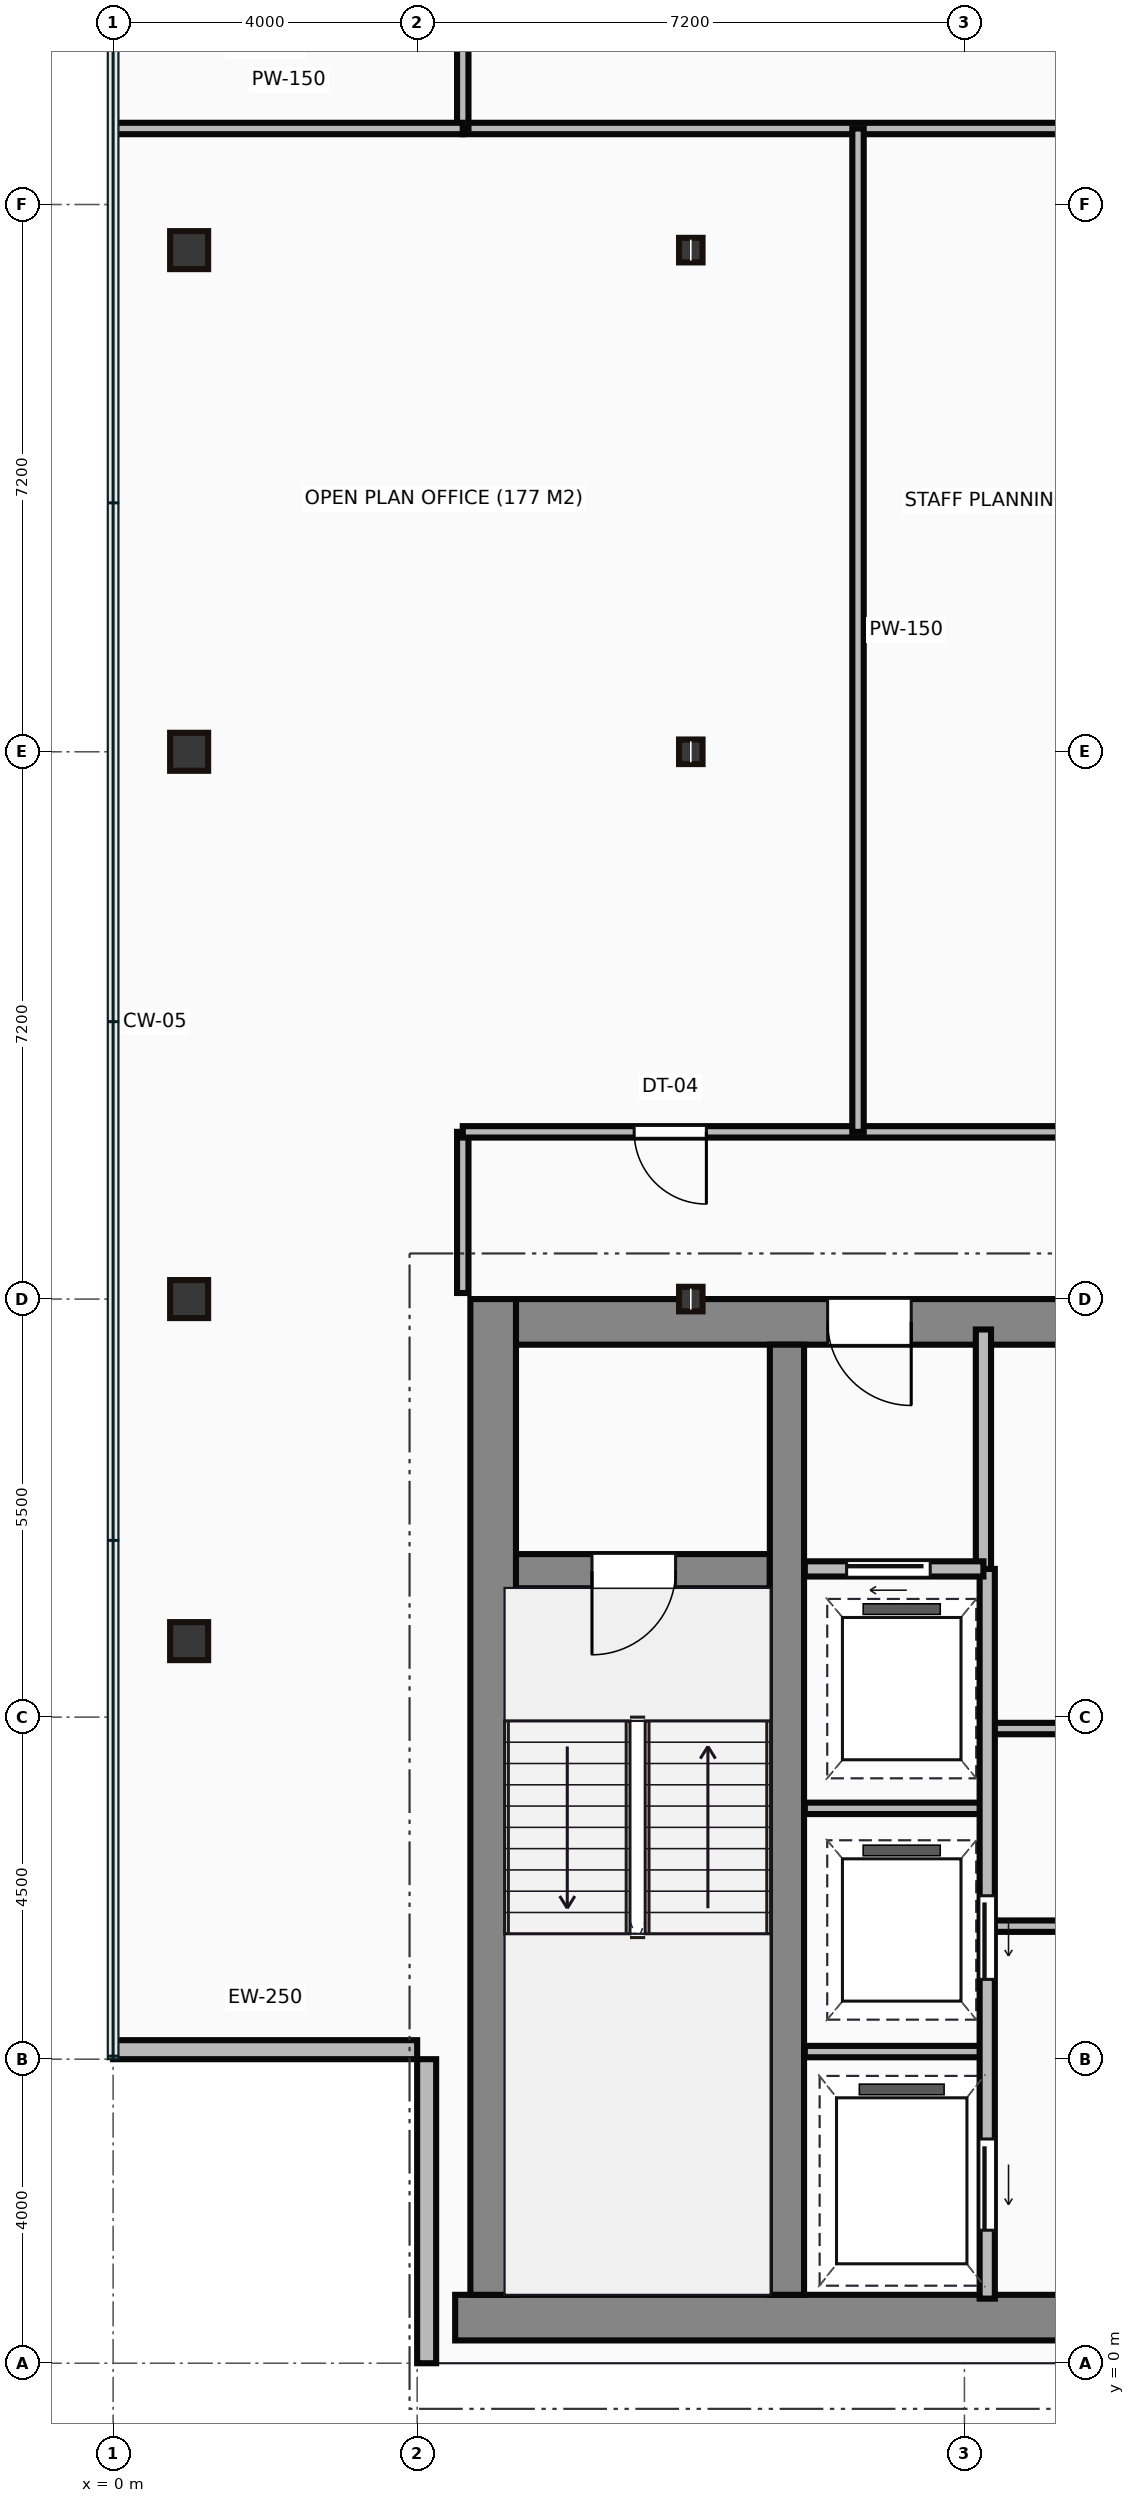
"""IFC4 building model, lengths in metres.
Left out: names, types, materials, properties, quantities, classifications, styles, units other than length and angle.
Written with IfcOpenShell. Run it as: python <this file> out.ifc"""

import sys

from ifc_helpers import new_model, si_unit, direction, frame, frame_2d, origin, origin_2d, place, context, subcontext, project, spatial, rectangle, hollow_rectangle, i_section, extrude, source, transform, mapped, element, fill, save


model = new_model("IFC4")
c1 = context("Model", 3, precision=1e-05, world=origin(), true_north=direction((0.0, 1.0)))
c2 = subcontext(c1, "Body", "Model", "MODEL_VIEW")
j1 = project(units=[si_unit("LENGTHUNIT", "METRE"), si_unit("PLANEANGLEUNIT", "RADIAN")], contexts=[c1])
p1 = place(None, origin())
s1 = spatial("IfcSite", under=j1, at=p1, CompositionType="ELEMENT")
p2 = place(p1, origin())
s2 = spatial("IfcBuilding", under=s1, at=p2, CompositionType="ELEMENT")
p3 = place(p2, frame((0.0, 0.0, 203.2)))
s3 = spatial("IfcBuildingStorey", under=s2, at=p3, CompositionType="ELEMENT", Elevation=203.2)
m1 = source(origin(), c2, "Body", "SweptSolid", [
    extrude(rectangle(XDim=29.5, YDim=0.6, at=frame_2d((14.75, 0.0))), origin(), (0.0, 0.0, 1.0), 3.65),
])
p4 = place(p3, frame((4.5, 0.6, 0.0), z_axis=(0.0, 0.0, 1.0), x_axis=(1.0, 0.0, 0.0)))
e1 = element("IfcWall", 1, at=p4, inside=s3, PredefinedType="SHEAR", context=c2, shape_type="MappedRepresentation", body=[
    mapped(m1, transform((0.0, 0.0, 0.0))),
])
m2 = source(origin(), c2, "Body", "SweptSolid", [
    extrude(rectangle(XDim=13.1, YDim=0.6, at=frame_2d((6.55, 0.0))), origin(), (0.0, 0.0, 1.0), 3.65),
])
p5 = place(p3, frame((5.0, 0.9, 0.0), z_axis=(0.0, 0.0, 1.0), x_axis=(0.0, 1.0, 0.0)))
e2 = element("IfcWall", 2, at=p5, inside=s3, PredefinedType="SHEAR", context=c2, shape_type="MappedRepresentation", body=[
    mapped(m2, transform((0.0, 0.0, 0.0))),
])
m3 = source(origin(), c2, "Body", "SweptSolid", [
    extrude(rectangle(XDim=9.1, YDim=0.6, at=frame_2d((4.55, 0.0))), origin(), (0.0, 0.0, 1.0), 3.65),
])
p6 = place(p3, frame((5.3, 13.7, 0.0), z_axis=(0.0, 0.0, 1.0), x_axis=(1.0, 0.0, 0.0)))
e3 = element("IfcWall", 3, at=p6, inside=s3, PredefinedType="SHEAR", context=c2, shape_type="MappedRepresentation", body=[
    mapped(m3, transform((0.0, 0.0, 0.0))),
])
p7 = place(p6, frame((4.1, 0.0, 0.0)))
e4 = element("IfcOpeningElement", 4, at=p7, cuts=e3, PredefinedType="OPENING", context=c2, shape_type="SweptSolid", body=[
    extrude(rectangle(XDim=1.1, YDim=2.15, at=frame_2d((0.55, 1.075))), frame((0.0, 0.31, 0.0), z_axis=(0.0, -1.0, 0.0), x_axis=(1.0, 0.0, 0.0)), (0.0, 0.0, 1.0), 0.62),
])
m4 = source(origin(), c2, "Body", "SweptSolid", [
    extrude(rectangle(XDim=12.5, YDim=0.45, at=frame_2d((6.25, 0.0))), origin(), (0.0, 0.0, 1.0), 3.65),
])
p8 = place(p3, frame((8.865, 0.9, 0.0), z_axis=(0.0, 0.0, 1.0), x_axis=(0.0, 1.0, 0.0)))
e5 = element("IfcWall", 5, at=p8, inside=s3, PredefinedType="SHEAR", context=c2, shape_type="MappedRepresentation", body=[
    mapped(m4, transform((0.0, 0.0, 0.0))),
])
m5 = source(origin(), c2, "Body", "SweptSolid", [
    extrude(rectangle(XDim=3.39, YDim=0.45, at=frame_2d((1.695, 0.0))), origin(), (0.0, 0.0, 1.0), 3.65),
])
p9 = place(p3, frame((5.25, 10.42, 0.0), z_axis=(0.0, 0.0, 1.0), x_axis=(1.0, 0.0, 0.0)))
e6 = element("IfcWall", 6, at=p9, inside=s3, PredefinedType="SHEAR", context=c2, shape_type="MappedRepresentation", body=[
    mapped(m5, transform((0.0, 0.0, 0.0))),
])
p10 = place(p9, frame((1.05, 0.0, 0.0)))
e7 = element("IfcOpeningElement", 7, at=p10, cuts=e6, PredefinedType="OPENING", context=c2, shape_type="SweptSolid", body=[
    extrude(rectangle(XDim=1.1, YDim=2.15, at=frame_2d((0.55, 1.075))), frame((0.0, 0.235, 0.0), z_axis=(0.0, -1.0, 0.0), x_axis=(1.0, 0.0, 0.0)), (0.0, 0.0, 1.0), 0.47),
])
m6 = source(origin(), c2, "Body", "SweptSolid", [
    extrude(hollow_rectangle(XDim=0.5, YDim=0.5, WallThickness=0.022, at=origin_2d()), origin(), (0.0, 0.0, 1.0), 3.65),
])
for number, where, z_axis, x_axis in (
    (8, (1.0, 9.5, 0.0), (0.0, 0.0, 1.0), (1.0, 0.0, 0.0)),
    (9, (1.0, 14.0, 0.0), (0.0, 0.0, 1.0), (1.0, 0.0, 0.0)),
    (10, (1.0, 21.2, 0.0), (0.0, 0.0, 1.0), (1.0, 0.0, 0.0)),
    (11, (1.0, 27.8, 0.0), (0.0, 0.0, 1.0), (1.0, 0.0, 0.0)),
):
    element("IfcColumn", number, at=place(p3, frame(where, z_axis=z_axis, x_axis=x_axis)), inside=s3, PredefinedType="COLUMN", context=c2, shape_type="MappedRepresentation", body=[
        mapped(m6, transform((0.0, 0.0, 0.0))),
    ])
m7 = source(origin(), c2, "Body", "SweptSolid", [
    extrude(i_section(OverallWidth=0.309, OverallDepth=0.323, WebThickness=0.014, FlangeThickness=0.023, at=origin_2d()), origin(), (0.0, 0.0, 1.0), 3.65),
])
for number, where, z_axis, x_axis in (
    (12, (7.6, 14.0, 0.0), (0.0, 0.0, 1.0), (1.0, 0.0, 0.0)),
    (13, (7.6, 21.2, 0.0), (0.0, 0.0, 1.0), (1.0, 0.0, 0.0)),
    (14, (7.6, 27.8, 0.0), (0.0, 0.0, 1.0), (1.0, 0.0, 0.0)),
):
    element("IfcColumn", number, at=place(p3, frame(where, z_axis=z_axis, x_axis=x_axis)), inside=s3, PredefinedType="COLUMN", context=c2, shape_type="MappedRepresentation", body=[
        mapped(m7, transform((0.0, 0.0, 0.0))),
    ])
m8 = source(origin(), c2, "Body", "SweptSolid", [
    extrude(rectangle(XDim=4.0, YDim=0.25, at=frame_2d((2.0, 0.0))), origin(), (0.0, 0.0, 1.0), 3.4),
])
for number, where, z_axis, x_axis in (
    (15, (0.0, 4.125, 0.0), (0.0, 0.0, 1.0), (1.0, 0.0, 0.0)),
    (16, (4.125, 4.0, 0.0), (0.0, 0.0, 1.0), (0.0, -1.0, 0.0)),
):
    element("IfcWall", number, at=place(p3, frame(where, z_axis=z_axis, x_axis=x_axis)), inside=s3, PredefinedType="STANDARD", context=c2, shape_type="MappedRepresentation", body=[
        mapped(m8, transform((0.0, 0.0, 0.0))),
    ])
m9 = source(origin(), c2, "Body", "SweptSolid", [
    extrude(rectangle(XDim=3.18, YDim=0.2, at=frame_2d((1.59, 0.0))), origin(), (0.0, 0.0, 1.0), 3.4),
])
p11 = place(p3, frame((11.45, 10.42, 0.0), z_axis=(0.0, 0.0, 1.0), x_axis=(0.0, 1.0, 0.0)))
e17 = element("IfcWall", 17, at=p11, inside=s3, PredefinedType="PARTITIONING", context=c2, shape_type="MappedRepresentation", body=[
    mapped(m9, transform((0.0, 0.0, 0.0))),
])
m10 = source(origin(), c2, "Body", "SweptSolid", [
    extrude(rectangle(XDim=2.35, YDim=0.2, at=frame_2d((1.175, 0.0))), origin(), (0.0, 0.0, 1.0), 3.4),
])
p12 = place(p3, frame((9.1, 10.45, 0.0), z_axis=(0.0, 0.0, 1.0), x_axis=(1.0, 0.0, 0.0)))
e18 = element("IfcWall", 18, at=p12, inside=s3, PredefinedType="PARTITIONING", context=c2, shape_type="MappedRepresentation", body=[
    mapped(m10, transform((0.0, 0.0, 0.0))),
])
p13 = place(p12, frame((0.55, 0.0, 0.0)))
e19 = element("IfcOpeningElement", 19, at=p13, cuts=e18, PredefinedType="OPENING", context=c2, shape_type="SweptSolid", body=[
    extrude(rectangle(XDim=1.1, YDim=2.15, at=frame_2d((0.55, 1.075))), frame((0.0, 0.11, 0.0), z_axis=(0.0, -1.0, 0.0), x_axis=(1.0, 0.0, 0.0)), (0.0, 0.0, 1.0), 0.22),
])
m11 = source(origin(), c2, "Body", "SweptSolid", [
    extrude(rectangle(XDim=9.6, YDim=0.2, at=frame_2d((4.8, 0.0))), origin(), (0.0, 0.0, 1.0), 3.4),
])
p14 = place(p3, frame((11.5, 0.85, 0.0), z_axis=(0.0, 0.0, 1.0), x_axis=(0.0, 1.0, 0.0)))
e20 = element("IfcWall", 20, at=p14, inside=s3, PredefinedType="PARTITIONING", context=c2, shape_type="MappedRepresentation", body=[
    mapped(m11, transform((0.0, 0.0, 0.0))),
])
p15 = place(p14, frame((4.2, 0.0, 0.0)))
e21 = element("IfcOpeningElement", 21, at=p15, cuts=e20, PredefinedType="OPENING", context=c2, shape_type="SweptSolid", body=[
    extrude(rectangle(XDim=1.1, YDim=2.15, at=frame_2d((0.55, 1.075))), frame((0.0, 0.11, 0.0), z_axis=(0.0, -1.0, 0.0), x_axis=(1.0, 0.0, 0.0)), (0.0, 0.0, 1.0), 0.22),
])
p16 = place(p14, frame((0.9, 0.0, 0.0)))
e22 = element("IfcOpeningElement", 22, at=p16, cuts=e20, PredefinedType="OPENING", context=c2, shape_type="SweptSolid", body=[
    extrude(rectangle(XDim=1.2, YDim=2.15, at=frame_2d((0.6, 1.075))), frame((0.0, 0.11, 0.0), z_axis=(0.0, -1.0, 0.0), x_axis=(1.0, 0.0, 0.0)), (0.0, 0.0, 1.0), 0.22),
])
m12 = source(origin(), c2, "Body", "SweptSolid", [
    extrude(rectangle(XDim=2.4, YDim=0.15, at=frame_2d((1.2, 0.0))), origin(), (0.0, 0.0, 1.0), 3.4),
])
for number, where, z_axis, x_axis in (
    (23, (9.1, 4.1, 0.0), (0.0, 0.0, 1.0), (1.0, 0.0, 0.0)),
    (24, (9.1, 7.3, 0.0), (0.0, 0.0, 1.0), (1.0, 0.0, 0.0)),
):
    element("IfcWall", number, at=place(p3, frame(where, z_axis=z_axis, x_axis=x_axis)), inside=s3, PredefinedType="PARTITIONING", context=c2, shape_type="MappedRepresentation", body=[
        mapped(m12, transform((0.0, 0.0, 0.0))),
    ])
m13 = source(origin(), c2, "Body", "SweptSolid", [
    extrude(rectangle(XDim=11.85, YDim=0.15, at=frame_2d((5.925, 0.0))), origin(), (0.0, 0.0, 1.0), 3.4),
])
p17 = place(p3, frame((11.55, 5.75, 0.0), z_axis=(0.0, 0.0, 1.0), x_axis=(1.0, 0.0, 0.0)))
e25 = element("IfcWall", 25, at=p17, inside=s3, PredefinedType="PARTITIONING", context=c2, shape_type="MappedRepresentation", body=[
    mapped(m13, transform((0.0, 0.0, 0.0))),
])
p18 = place(p3, frame((11.55, 8.35, 0.0), z_axis=(0.0, 0.0, 1.0), x_axis=(1.0, 0.0, 0.0)))
e26 = element("IfcWall", 26, at=p18, inside=s3, PredefinedType="PARTITIONING", context=c2, shape_type="MappedRepresentation", body=[
    mapped(m13, transform((0.0, 0.0, 0.0))),
])
p19 = place(p18, frame((1.1, 0.0, 0.0)))
e27 = element("IfcOpeningElement", 27, at=p19, cuts=e26, PredefinedType="OPENING", context=c2, shape_type="SweptSolid", body=[
    extrude(rectangle(XDim=0.95, YDim=2.15, at=frame_2d((0.475, 1.075))), frame((0.0, 0.085, 0.0), z_axis=(0.0, -1.0, 0.0), x_axis=(1.0, 0.0, 0.0)), (0.0, 0.0, 1.0), 0.17),
])
p20 = place(p18, frame((9.4, 0.0, 0.0)))
e28 = element("IfcOpeningElement", 28, at=p20, cuts=e26, PredefinedType="OPENING", context=c2, shape_type="SweptSolid", body=[
    extrude(rectangle(XDim=0.95, YDim=2.15, at=frame_2d((0.475, 1.075))), frame((0.0, 0.085, 0.0), z_axis=(0.0, -1.0, 0.0), x_axis=(1.0, 0.0, 0.0)), (0.0, 0.0, 1.0), 0.17),
])
m14 = source(origin(), c2, "Body", "SweptSolid", [
    extrude(rectangle(XDim=2.12, YDim=0.15, at=frame_2d((1.06, 0.0))), origin(), (0.0, 0.0, 1.0), 3.4),
])
p21 = place(p3, frame((4.6, 14.08, 0.0), z_axis=(0.0, 0.0, 1.0), x_axis=(0.0, 1.0, 0.0)))
e29 = element("IfcWall", 29, at=p21, inside=s3, PredefinedType="PARTITIONING", context=c2, shape_type="MappedRepresentation", body=[
    mapped(m14, transform((0.0, 0.0, 0.0))),
])
m15 = source(origin(), c2, "Body", "SweptSolid", [
    extrude(rectangle(XDim=22.2, YDim=0.15, at=frame_2d((11.1, 0.0))), origin(), (0.0, 0.0, 1.0), 3.4),
])
p22 = place(p3, frame((4.6, 16.2, 0.0), z_axis=(0.0, 0.0, 1.0), x_axis=(1.0, 0.0, 0.0)))
e30 = element("IfcWall", 30, at=p22, inside=s3, PredefinedType="PARTITIONING", context=c2, shape_type="MappedRepresentation", body=[
    mapped(m15, transform((0.0, 0.0, 0.0))),
])
p23 = place(p22, frame((2.255, 0.0, 0.0)))
e31 = element("IfcOpeningElement", 31, at=p23, cuts=e30, PredefinedType="OPENING", context=c2, shape_type="SweptSolid", body=[
    extrude(rectangle(XDim=0.95, YDim=2.15, at=frame_2d((0.475, 1.075))), frame((0.0, 0.085, 0.0), z_axis=(0.0, -1.0, 0.0), x_axis=(1.0, 0.0, 0.0)), (0.0, 0.0, 1.0), 0.17),
])
p24 = place(p22, frame((9.025, 0.0, 0.0)))
e32 = element("IfcOpeningElement", 32, at=p24, cuts=e30, PredefinedType="OPENING", context=c2, shape_type="SweptSolid", body=[
    extrude(rectangle(XDim=0.95, YDim=2.15, at=frame_2d((0.475, 1.075))), frame((0.0, 0.085, 0.0), z_axis=(0.0, -1.0, 0.0), x_axis=(1.0, 0.0, 0.0)), (0.0, 0.0, 1.0), 0.17),
])
p25 = place(p3, frame((26.8, 29.4, 0.0), z_axis=(0.0, 0.0, 1.0), x_axis=(-1.0, 0.0, 0.0)))
e33 = element("IfcWall", 33, at=p25, inside=s3, PredefinedType="PARTITIONING", context=c2, shape_type="MappedRepresentation", body=[
    mapped(m15, transform((0.0, 0.0, 0.0))),
])
m16 = source(origin(), c2, "Body", "SweptSolid", [
    extrude(rectangle(XDim=2.05, YDim=0.15, at=frame_2d((1.025, 0.0))), origin(), (0.0, 0.0, 1.0), 3.4),
])
p26 = place(p3, frame((4.6, 29.4, 0.0), z_axis=(0.0, 0.0, 1.0), x_axis=(0.0, 1.0, 0.0)))
e34 = element("IfcWall", 34, at=p26, inside=s3, PredefinedType="PARTITIONING", context=c2, shape_type="MappedRepresentation", body=[
    mapped(m16, transform((0.0, 0.0, 0.0))),
])
m17 = source(origin(), c2, "Body", "SweptSolid", [
    extrude(rectangle(XDim=4.58, YDim=0.15, at=frame_2d((2.29, 0.0))), origin(), (0.0, 0.0, 1.0), 3.4),
])
p27 = place(p3, frame((0.02, 29.4, 0.0), z_axis=(0.0, 0.0, 1.0), x_axis=(1.0, 0.0, 0.0)))
e35 = element("IfcWall", 35, at=p27, inside=s3, PredefinedType="PARTITIONING", context=c2, shape_type="MappedRepresentation", body=[
    mapped(m17, transform((0.0, 0.0, 0.0))),
])
m18 = source(origin(), c2, "Body", "SweptSolid", [
    extrude(rectangle(XDim=13.2, YDim=0.15, at=frame_2d((6.6, 0.0))), origin(), (0.0, 0.0, 1.0), 3.4),
])
p28 = place(p3, frame((9.8, 29.4, 0.0), z_axis=(0.0, 0.0, 1.0), x_axis=(0.0, -1.0, 0.0)))
e36 = element("IfcWall", 36, at=p28, inside=s3, PredefinedType="PARTITIONING", context=c2, shape_type="MappedRepresentation", body=[
    mapped(m18, transform((0.0, 0.0, 0.0))),
])
m19 = source(origin(), c2, "Body", "SweptSolid", [
    extrude(rectangle(XDim=1.1, YDim=2.15, at=frame_2d((0.55, 1.075))), frame((0.0, 0.025, 0.0), z_axis=(0.0, -1.0, 0.0), x_axis=(1.0, 0.0, 0.0)), (0.0, 0.0, 1.0), 0.05),
])
p29 = place(p10, frame((1.1, 0.0, 0.0), z_axis=(0.0, 0.0, 1.0), x_axis=(-1.0, 0.0, 0.0)))
e37 = element("IfcDoor", 37, at=p29, inside=s3, OperationType="SINGLE_SWING_LEFT", PredefinedType="DOOR", context=c2, shape_type="MappedRepresentation", body=[
    mapped(m19, transform((0.0, 0.0, 0.0))),
])
fill(e7, e37)
p30 = place(p7, origin())
e38 = element("IfcDoor", 38, at=p30, inside=s3, OperationType="SINGLE_SWING_RIGHT", PredefinedType="DOOR", context=c2, shape_type="MappedRepresentation", body=[
    mapped(m19, transform((0.0, 0.0, 0.0))),
])
fill(e4, e38)
p31 = place(p13, origin())
e39 = element("IfcDoor", 39, at=p31, inside=s3, OperationType="SLIDING_TO_LEFT", PredefinedType="DOOR", context=c2, shape_type="MappedRepresentation", body=[
    mapped(m19, transform((0.0, 0.0, 0.0))),
])
fill(e19, e39)
p32 = place(p15, frame((1.1, 0.0, 0.0), z_axis=(0.0, 0.0, 1.0), x_axis=(-1.0, 0.0, 0.0)))
e40 = element("IfcDoor", 40, at=p32, inside=s3, OperationType="SLIDING_TO_LEFT", PredefinedType="DOOR", context=c2, shape_type="MappedRepresentation", body=[
    mapped(m19, transform((0.0, 0.0, 0.0))),
])
fill(e21, e40)
m20 = source(origin(), c2, "Body", "SweptSolid", [
    extrude(rectangle(XDim=1.2, YDim=2.15, at=frame_2d((0.6, 1.075))), frame((0.0, 0.025, 0.0), z_axis=(0.0, -1.0, 0.0), x_axis=(1.0, 0.0, 0.0)), (0.0, 0.0, 1.0), 0.05),
])
p33 = place(p16, frame((1.2, 0.0, 0.0), z_axis=(0.0, 0.0, 1.0), x_axis=(-1.0, 0.0, 0.0)))
e41 = element("IfcDoor", 41, at=p33, inside=s3, OperationType="SLIDING_TO_LEFT", PredefinedType="DOOR", context=c2, shape_type="MappedRepresentation", body=[
    mapped(m20, transform((0.0, 0.0, 0.0))),
])
fill(e22, e41)
m21 = source(origin(), c2, "Body", "SweptSolid", [
    extrude(rectangle(XDim=0.95, YDim=2.15, at=frame_2d((0.475, 1.075))), frame((0.0, 0.025, 0.0), z_axis=(0.0, -1.0, 0.0), x_axis=(1.0, 0.0, 0.0)), (0.0, 0.0, 1.0), 0.05),
])
p34 = place(p23, origin())
e42 = element("IfcDoor", 42, at=p34, inside=s3, OperationType="SINGLE_SWING_RIGHT", PredefinedType="DOOR", context=c2, shape_type="MappedRepresentation", body=[
    mapped(m21, transform((0.0, 0.0, 0.0))),
])
fill(e31, e42)
save(model, sys.argv[1])
